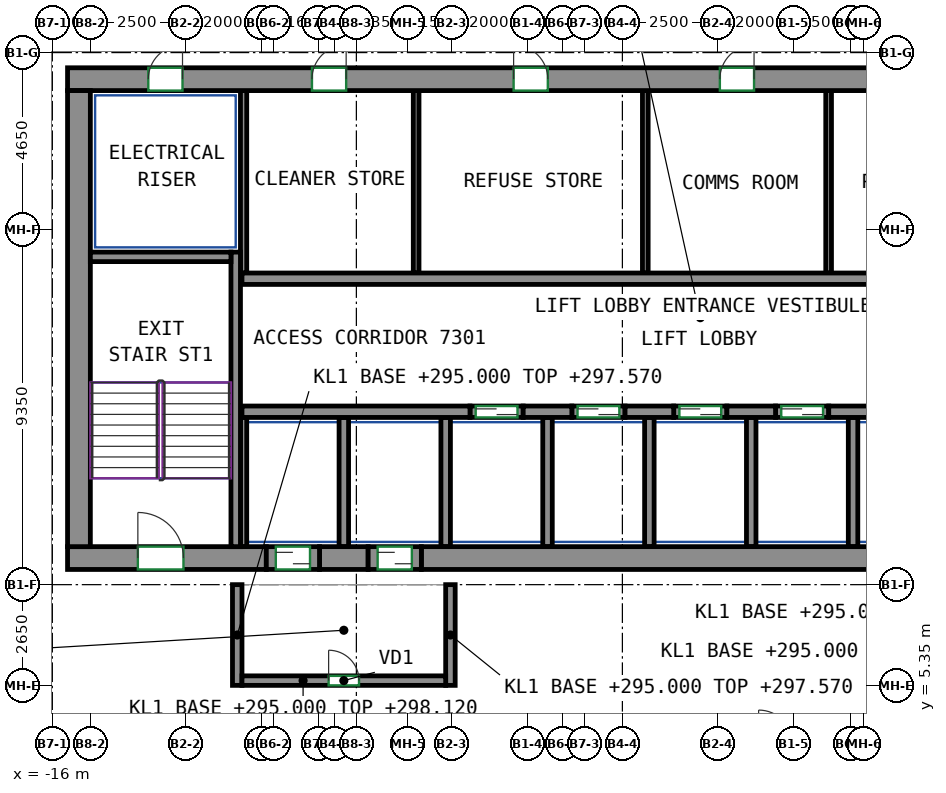
"""IFC4 building model, lengths in metres.
Left out: names, types, materials, properties, quantities, classifications, styles, units other than length and angle.
Written with IfcOpenShell. Run it as: python <this file> out.ifc"""

import sys

from ifc_helpers import new_model, si_unit, direction, frame, frame_2d, origin, place, context, subcontext, project, spatial, rectangle, extrude, source, transform, mapped, element, fill, save


model = new_model("IFC4")
c1 = context("Model", 3, precision=1e-05, world=origin(), true_north=direction((0.0, 1.0)))
c2 = subcontext(c1, "Body", "Model", "MODEL_VIEW")
j1 = project(units=[si_unit("LENGTHUNIT", "METRE"), si_unit("PLANEANGLEUNIT", "RADIAN")], contexts=[c1])
p1 = place(None, origin())
s1 = spatial("IfcSite", under=j1, at=p1, CompositionType="ELEMENT")
p2 = place(p1, origin())
s2 = spatial("IfcBuilding", under=s1, at=p2, CompositionType="ELEMENT")
p3 = place(p2, frame((0.0, 0.0, 295.0)))
s3 = spatial("IfcBuildingStorey", under=s2, at=p3, CompositionType="ELEMENT", Elevation=295.0)
m1 = source(origin(), c2, "Body", "SweptSolid", [
    extrude(rectangle(XDim=5.23, YDim=0.6, at=frame_2d((2.615, 0.0))), origin(), (0.0, 0.0, 1.0), 3.12),
])
p4 = place(p3, frame((-15.6, 8.7, 0.0), z_axis=(0.0, 0.0, 1.0), x_axis=(1.0, 0.0, 0.0)))
e1 = element("IfcWall", 1, at=p4, inside=s3, PredefinedType="SHEAR", context=c2, shape_type="MappedRepresentation", body=[
    mapped(m1, transform((0.0, 0.0, 0.0))),
])
p5 = place(p4, frame((1.85, 0.0, 0.0)))
e2 = element("IfcOpeningElement", 2, at=p5, cuts=e1, PredefinedType="OPENING", context=c2, shape_type="SweptSolid", body=[
    extrude(rectangle(XDim=1.2, YDim=2.1, at=frame_2d((0.6, 1.05))), frame((0.0, 0.31, 0.0), z_axis=(0.0, -1.0, 0.0), x_axis=(1.0, 0.0, 0.0)), (0.0, 0.0, 1.0), 0.62),
])
m2 = source(origin(), c2, "Body", "SweptSolid", [
    extrude(rectangle(XDim=1.28, YDim=0.6, at=frame_2d((0.64, 0.0))), origin(), (0.0, 0.0, 1.0), 3.12),
])
p6 = place(p3, frame((-8.97, 8.7, 0.0), z_axis=(0.0, 0.0, 1.0), x_axis=(1.0, 0.0, 0.0)))
e3 = element("IfcWall", 3, at=p6, inside=s3, PredefinedType="SHEAR", context=c2, shape_type="MappedRepresentation", body=[
    mapped(m2, transform((0.0, 0.0, 0.0))),
])
m3 = source(origin(), c2, "Body", "SweptSolid", [
    extrude(rectangle(XDim=14.18, YDim=0.6, at=frame_2d((7.09, 0.0))), origin(), (0.0, 0.0, 1.0), 3.12),
])
p7 = place(p3, frame((-6.29, 8.7, 0.0), z_axis=(0.0, 0.0, 1.0), x_axis=(1.0, 0.0, 0.0)))
e4 = element("IfcWall", 4, at=p7, inside=s3, PredefinedType="SHEAR", context=c2, shape_type="MappedRepresentation", body=[
    mapped(m3, transform((0.0, 0.0, 0.0))),
])
m4 = source(origin(), c2, "Body", "SweptSolid", [
    extrude(rectangle(XDim=33.3, YDim=0.6, at=frame_2d((16.65, 0.0))), origin(), (0.0, 0.0, 1.0), 3.12),
])
p8 = place(p3, frame((-15.6, 21.3, 0.0), z_axis=(0.0, 0.0, 1.0), x_axis=(1.0, 0.0, 0.0)))
e5 = element("IfcWall", 5, at=p8, inside=s3, PredefinedType="SHEAR", context=c2, shape_type="MappedRepresentation", body=[
    mapped(m4, transform((0.0, 0.0, 0.0))),
])
p9 = place(p8, frame((6.431, 0.0, 0.0)))
e6 = element("IfcOpeningElement", 6, at=p9, cuts=e5, PredefinedType="OPENING", context=c2, shape_type="SweptSolid", body=[
    extrude(rectangle(XDim=0.9, YDim=2.1, at=frame_2d((0.45, 1.05))), frame((0.0, 0.31, 0.0), z_axis=(0.0, -1.0, 0.0), x_axis=(1.0, 0.0, 0.0)), (0.0, 0.0, 1.0), 0.62),
])
p10 = place(p8, frame((11.738, 0.0, 0.0)))
e7 = element("IfcOpeningElement", 7, at=p10, cuts=e5, PredefinedType="OPENING", context=c2, shape_type="SweptSolid", body=[
    extrude(rectangle(XDim=0.9, YDim=2.1, at=frame_2d((0.45, 1.05))), frame((0.0, 0.31, 0.0), z_axis=(0.0, -1.0, 0.0), x_axis=(1.0, 0.0, 0.0)), (0.0, 0.0, 1.0), 0.62),
])
p11 = place(p8, frame((17.165, 0.0, 0.0)))
e8 = element("IfcOpeningElement", 8, at=p11, cuts=e5, PredefinedType="OPENING", context=c2, shape_type="SweptSolid", body=[
    extrude(rectangle(XDim=0.9, YDim=2.1, at=frame_2d((0.45, 1.05))), frame((0.0, 0.31, 0.0), z_axis=(0.0, -1.0, 0.0), x_axis=(1.0, 0.0, 0.0)), (0.0, 0.0, 1.0), 0.62),
])
p12 = place(p8, frame((21.386, 0.0, 0.0)))
e9 = element("IfcOpeningElement", 9, at=p12, cuts=e5, PredefinedType="OPENING", context=c2, shape_type="SweptSolid", body=[
    extrude(rectangle(XDim=0.9, YDim=2.1, at=frame_2d((0.45, 1.05))), frame((0.0, 0.31, 0.0), z_axis=(0.0, -1.0, 0.0), x_axis=(1.0, 0.0, 0.0)), (0.0, 0.0, 1.0), 0.62),
])
p13 = place(p8, frame((24.387, 0.0, 0.0)))
e10 = element("IfcOpeningElement", 10, at=p13, cuts=e5, PredefinedType="OPENING", context=c2, shape_type="SweptSolid", body=[
    extrude(rectangle(XDim=0.9, YDim=2.1, at=frame_2d((0.45, 1.05))), frame((0.0, 0.31, 0.0), z_axis=(0.0, -1.0, 0.0), x_axis=(1.0, 0.0, 0.0)), (0.0, 0.0, 1.0), 0.62),
])
p14 = place(p8, frame((26.92, 0.0, 0.0)))
e11 = element("IfcOpeningElement", 11, at=p14, cuts=e5, PredefinedType="OPENING", context=c2, shape_type="SweptSolid", body=[
    extrude(rectangle(XDim=0.9, YDim=2.1, at=frame_2d((0.45, 1.05))), frame((0.0, 0.31, 0.0), z_axis=(0.0, -1.0, 0.0), x_axis=(1.0, 0.0, 0.0)), (0.0, 0.0, 1.0), 0.62),
])
p15 = place(p8, frame((2.125, 0.0, 0.0)))
e12 = element("IfcOpeningElement", 12, at=p15, cuts=e5, PredefinedType="OPENING", context=c2, shape_type="SweptSolid", body=[
    extrude(rectangle(XDim=0.9, YDim=2.1, at=frame_2d((0.45, 1.05))), frame((0.0, 0.31, 0.0), z_axis=(0.0, -1.0, 0.0), x_axis=(1.0, 0.0, 0.0)), (0.0, 0.0, 1.0), 0.62),
])
p16 = place(p8, frame((30.275, 0.0, 0.0)))
e13 = element("IfcOpeningElement", 13, at=p16, cuts=e5, PredefinedType="OPENING", context=c2, shape_type="SweptSolid", body=[
    extrude(rectangle(XDim=0.9, YDim=2.1, at=frame_2d((0.45, 1.05))), frame((0.0, 0.31, 0.0), z_axis=(0.0, -1.0, 0.0), x_axis=(1.0, 0.0, 0.0)), (0.0, 0.0, 1.0), 0.62),
])
m5 = source(origin(), c2, "Body", "SweptSolid", [
    extrude(rectangle(XDim=12.0, YDim=0.6, at=frame_2d((6.0, 0.0))), origin(), (0.0, 0.0, 1.0), 3.12),
])
p17 = place(p3, frame((-15.3, 9.0, 0.0), z_axis=(0.0, 0.0, 1.0), x_axis=(0.0, 1.0, 0.0)))
e14 = element("IfcWall", 14, at=p17, inside=s3, PredefinedType="SHEAR", context=c2, shape_type="MappedRepresentation", body=[
    mapped(m5, transform((0.0, 0.0, 0.0))),
])
m6 = source(origin(), c2, "Body", "SweptSolid", [
    extrude(rectangle(XDim=7.75, YDim=0.25, at=frame_2d((3.875, 0.0))), origin(), (0.0, 0.0, 1.0), 3.12),
])
p18 = place(p3, frame((-11.175, 9.0, 0.0), z_axis=(0.0, 0.0, 1.0), x_axis=(0.0, 1.0, 0.0)))
e15 = element("IfcWall", 15, at=p18, inside=s3, PredefinedType="SHEAR", context=c2, shape_type="MappedRepresentation", body=[
    mapped(m6, transform((0.0, 0.0, 0.0))),
])
m7 = source(origin(), c2, "Body", "SweptSolid", [
    extrude(rectangle(XDim=3.7, YDim=0.25, at=frame_2d((1.85, 0.0))), origin(), (0.0, 0.0, 1.0), 3.12),
])
p19 = place(p3, frame((-15.0, 16.625, 0.0), z_axis=(0.0, 0.0, 1.0), x_axis=(1.0, 0.0, 0.0)))
e16 = element("IfcWall", 16, at=p19, inside=s3, PredefinedType="SHEAR", context=c2, shape_type="MappedRepresentation", body=[
    mapped(m7, transform((0.0, 0.0, 0.0))),
])
m8 = source(origin(), c2, "Body", "SweptSolid", [
    extrude(rectangle(XDim=6.0, YDim=0.3, at=frame_2d((3.0, 0.0))), origin(), (0.0, 0.0, 1.0), 3.12),
])
p20 = place(p3, frame((-11.01, 12.55, 0.0), z_axis=(0.0, 0.0, 1.0), x_axis=(1.0, 0.0, 0.0)))
e17 = element("IfcWall", 17, at=p20, inside=s3, PredefinedType="SHEAR", context=c2, shape_type="MappedRepresentation", body=[
    mapped(m8, transform((0.0, 0.0, 0.0))),
])
m9 = source(origin(), c2, "Body", "SweptSolid", [
    extrude(rectangle(XDim=1.28, YDim=0.3, at=frame_2d((0.64, 0.0))), origin(), (0.0, 0.0, 1.0), 3.12),
])
for number, where, z_axis, x_axis in (
    (18, (-3.61, 12.55, 0.0), (0.0, 0.0, 1.0), (1.0, 0.0, 0.0)),
    (19, (-0.93, 12.55, 0.0), (0.0, 0.0, 1.0), (1.0, 0.0, 0.0)),
    (20, (1.75, 12.55, 0.0), (0.0, 0.0, 1.0), (1.0, 0.0, 0.0)),
    (21, (4.43, 12.55, 0.0), (0.0, 0.0, 1.0), (1.0, 0.0, 0.0)),
):
    element("IfcWall", number, at=place(p3, frame(where, z_axis=z_axis, x_axis=x_axis)), inside=s3, PredefinedType="SHEAR", context=c2, shape_type="MappedRepresentation", body=[
        mapped(m9, transform((0.0, 0.0, 0.0))),
    ])
m10 = source(origin(), c2, "Body", "SweptSolid", [
    extrude(rectangle(XDim=22.08, YDim=0.3, at=frame_2d((11.04, 0.0))), origin(), (0.0, 0.0, 1.0), 3.12),
])
p21 = place(p3, frame((-11.01, 16.05, 0.0), z_axis=(0.0, 0.0, 1.0), x_axis=(1.0, 0.0, 0.0)))
e22 = element("IfcWall", 22, at=p21, inside=s3, PredefinedType="SHEAR", context=c2, shape_type="MappedRepresentation", body=[
    mapped(m10, transform((0.0, 0.0, 0.0))),
])
m11 = source(origin(), c2, "Body", "SweptSolid", [
    extrude(rectangle(XDim=1.4, YDim=0.3, at=frame_2d((0.7, 0.0))), origin(), (0.0, 0.0, 1.0), 3.12),
])
p22 = place(p3, frame((-5.01, 12.55, 0.0), z_axis=(0.0, 0.0, 1.0), x_axis=(1.0, 0.0, 0.0)))
e23 = element("IfcWall", 23, at=p22, inside=s3, PredefinedType="PARTITIONING", context=c2, shape_type="MappedRepresentation", body=[
    mapped(m11, transform((0.0, 0.0, 0.0))),
])
p23 = place(p22, frame((0.15, 0.0, 0.0)))
e24 = element("IfcOpeningElement", 24, at=p23, cuts=e23, PredefinedType="OPENING", context=c2, shape_type="SweptSolid", body=[
    extrude(rectangle(XDim=1.1, YDim=2.1, at=frame_2d((0.55, 1.05))), frame((0.0, 0.16, 0.0), z_axis=(0.0, -1.0, 0.0), x_axis=(1.0, 0.0, 0.0)), (0.0, 0.0, 1.0), 0.32),
])
m12 = source(origin(), c2, "Body", "SweptSolid", [
    extrude(rectangle(XDim=1.4, YDim=0.3, at=frame_2d((0.7, 0.0))), origin(), (0.0, 0.0, 1.0), 3.12),
])
p24 = place(p3, frame((-2.33, 12.55, 0.0), z_axis=(0.0, 0.0, 1.0), x_axis=(1.0, 0.0, 0.0)))
e25 = element("IfcWall", 25, at=p24, inside=s3, PredefinedType="PARTITIONING", context=c2, shape_type="MappedRepresentation", body=[
    mapped(m12, transform((0.0, 0.0, 0.0))),
])
p25 = place(p24, frame((0.15, 0.0, 0.0)))
e26 = element("IfcOpeningElement", 26, at=p25, cuts=e25, PredefinedType="OPENING", context=c2, shape_type="SweptSolid", body=[
    extrude(rectangle(XDim=1.1, YDim=2.1, at=frame_2d((0.55, 1.05))), frame((0.0, 0.16, 0.0), z_axis=(0.0, -1.0, 0.0), x_axis=(1.0, 0.0, 0.0)), (0.0, 0.0, 1.0), 0.32),
])
p26 = place(p3, frame((0.35, 12.55, 0.0), z_axis=(0.0, 0.0, 1.0), x_axis=(1.0, 0.0, 0.0)))
e27 = element("IfcWall", 27, at=p26, inside=s3, PredefinedType="PARTITIONING", context=c2, shape_type="MappedRepresentation", body=[
    mapped(m11, transform((0.0, 0.0, 0.0))),
])
p27 = place(p26, frame((0.15, 0.0, 0.0)))
e28 = element("IfcOpeningElement", 28, at=p27, cuts=e27, PredefinedType="OPENING", context=c2, shape_type="SweptSolid", body=[
    extrude(rectangle(XDim=1.1, YDim=2.1, at=frame_2d((0.55, 1.05))), frame((0.0, 0.16, 0.0), z_axis=(0.0, -1.0, 0.0), x_axis=(1.0, 0.0, 0.0)), (0.0, 0.0, 1.0), 0.32),
])
p28 = place(p3, frame((3.03, 12.55, 0.0), z_axis=(0.0, 0.0, 1.0), x_axis=(1.0, 0.0, 0.0)))
e29 = element("IfcWall", 29, at=p28, inside=s3, PredefinedType="PARTITIONING", context=c2, shape_type="MappedRepresentation", body=[
    mapped(m11, transform((0.0, 0.0, 0.0))),
])
p29 = place(p28, frame((0.15, 0.0, 0.0)))
e30 = element("IfcOpeningElement", 30, at=p29, cuts=e29, PredefinedType="OPENING", context=c2, shape_type="SweptSolid", body=[
    extrude(rectangle(XDim=1.1, YDim=2.1, at=frame_2d((0.55, 1.05))), frame((0.0, 0.16, 0.0), z_axis=(0.0, -1.0, 0.0), x_axis=(1.0, 0.0, 0.0)), (0.0, 0.0, 1.0), 0.32),
])
m13 = source(origin(), c2, "Body", "SweptSolid", [
    extrude(rectangle(XDim=2.65, YDim=0.25, at=frame_2d((1.325, 0.0))), origin(), (0.0, 0.0, 1.0), 2.57),
])
for number, where, z_axis, x_axis in (
    (31, (-11.135, 5.35, 0.0), (0.0, 0.0, 1.0), (0.0, 1.0, 0.0)),
    (32, (-5.525, 5.35, 0.0), (0.0, 0.0, 1.0), (0.0, 1.0, 0.0)),
):
    element("IfcWall", number, at=place(p3, frame(where, z_axis=z_axis, x_axis=x_axis)), inside=s3, PredefinedType="PARTITIONING", context=c2, shape_type="MappedRepresentation", body=[
        mapped(m13, transform((0.0, 0.0, 0.0))),
    ])
m14 = source(origin(), c2, "Body", "SweptSolid", [
    extrude(rectangle(XDim=5.36, YDim=0.25, at=frame_2d((2.68, 0.0))), origin(), (0.0, 0.0, 1.0), 3.12),
])
p30 = place(p3, frame((-11.01, 5.475, 0.0), z_axis=(0.0, 0.0, 1.0), x_axis=(1.0, 0.0, 0.0)))
e33 = element("IfcWall", 33, at=p30, inside=s3, PredefinedType="PARTITIONING", context=c2, shape_type="MappedRepresentation", body=[
    mapped(m14, transform((0.0, 0.0, 0.0))),
])
p31 = place(p30, frame((2.28, 0.0, 0.0)))
e34 = element("IfcOpeningElement", 34, at=p31, cuts=e33, PredefinedType="OPENING", context=c2, shape_type="SweptSolid", body=[
    extrude(rectangle(XDim=0.8, YDim=2.0, at=frame_2d((0.4, 1.0))), frame((0.0, 0.135, 0.0), z_axis=(0.0, -1.0, 0.0), x_axis=(1.0, 0.0, 0.0)), (0.0, 0.0, 1.0), 0.27),
])
m15 = source(origin(), c2, "Body", "SweptSolid", [
    extrude(rectangle(XDim=4.8, YDim=0.165, at=frame_2d((2.4, 0.0))), origin(), (0.0, 0.0, 1.0), 3.12),
])
p32 = place(p3, frame((-10.968, 16.2, 0.0), z_axis=(0.0, 0.0, 1.0), x_axis=(0.0, 1.0, 0.0)))
e35 = element("IfcWall", 35, at=p32, inside=s3, PredefinedType="PARTITIONING", context=c2, shape_type="MappedRepresentation", body=[
    mapped(m15, transform((0.0, 0.0, 0.0))),
])
m16 = source(origin(), c2, "Body", "SweptSolid", [
    extrude(rectangle(XDim=3.4, YDim=0.25, at=frame_2d((1.7, 0.0))), origin(), (0.0, 0.0, 1.0), 3.12),
])
for number, where, z_axis, x_axis in (
    (36, (2.39, 9.0, 0.0), (0.0, 0.0, 1.0), (0.0, 1.0, 0.0)),
    (37, (5.07, 9.0, 0.0), (0.0, 0.0, 1.0), (0.0, 1.0, 0.0)),
    (38, (-0.29, 9.0, 0.0), (0.0, 0.0, 1.0), (0.0, 1.0, 0.0)),
):
    element("IfcWall", number, at=place(p3, frame(where, z_axis=z_axis, x_axis=x_axis)), inside=s3, PredefinedType="PARTITIONING", context=c2, shape_type="MappedRepresentation", body=[
        mapped(m16, transform((0.0, 0.0, 0.0))),
    ])
m17 = source(origin(), c2, "Body", "SweptSolid", [
    extrude(rectangle(XDim=3.4, YDim=0.165, at=frame_2d((1.7, 0.0))), origin(), (0.0, 0.0, 1.0), 3.12),
])
p33 = place(p3, frame((-10.968, 9.0, 0.0), z_axis=(0.0, 0.0, 1.0), x_axis=(0.0, 1.0, 0.0)))
e39 = element("IfcWall", 39, at=p33, inside=s3, PredefinedType="PARTITIONING", context=c2, shape_type="MappedRepresentation", body=[
    mapped(m17, transform((0.0, 0.0, 0.0))),
])
for number, where, z_axis, x_axis in (
    (40, (-2.97, 9.0, 0.0), (0.0, 0.0, 1.0), (0.0, 1.0, 0.0)),
    (41, (-5.65, 9.0, 0.0), (0.0, 0.0, 1.0), (0.0, 1.0, 0.0)),
    (42, (-8.33, 9.0, 0.0), (0.0, 0.0, 1.0), (0.0, 1.0, 0.0)),
):
    element("IfcWall", number, at=place(p3, frame(where, z_axis=z_axis, x_axis=x_axis)), inside=s3, PredefinedType="PARTITIONING", context=c2, shape_type="MappedRepresentation", body=[
        mapped(m16, transform((0.0, 0.0, 0.0))),
    ])
m18 = source(origin(), c2, "Body", "SweptSolid", [
    extrude(rectangle(XDim=4.8, YDim=0.15, at=frame_2d((2.4, 0.0))), origin(), (0.0, 0.0, 1.0), 3.12),
])
for number, where, z_axis, x_axis in (
    (43, (-6.427, 16.2, 0.0), (0.0, 0.0, 1.0), (0.0, 1.0, 0.0)),
    (44, (-0.397, 16.2, 0.0), (0.0, 0.0, 1.0), (0.0, 1.0, 0.0)),
    (45, (4.427, 16.2, 0.0), (0.0, 0.0, 1.0), (0.0, 1.0, 0.0)),
):
    element("IfcWall", number, at=place(p3, frame(where, z_axis=z_axis, x_axis=x_axis)), inside=s3, PredefinedType="PARTITIONING", context=c2, shape_type="MappedRepresentation", body=[
        mapped(m18, transform((0.0, 0.0, 0.0))),
    ])
m19 = source(origin(), c2, "Body", "SweptSolid", [
    extrude(rectangle(XDim=1.4, YDim=0.6, at=frame_2d((0.7, 0.0))), origin(), (0.0, 0.0, 1.0), 2.7),
])
p34 = place(p3, frame((-10.37, 8.7, 0.0), z_axis=(0.0, 0.0, 1.0), x_axis=(1.0, 0.0, 0.0)))
e46 = element("IfcWall", 46, at=p34, inside=s3, PredefinedType="PARTITIONING", context=c2, shape_type="MappedRepresentation", body=[
    mapped(m19, transform((0.0, 0.0, 0.0))),
])
p35 = place(p34, frame((0.25, 0.0, 0.0)))
e47 = element("IfcOpeningElement", 47, at=p35, cuts=e46, PredefinedType="OPENING", context=c2, shape_type="SweptSolid", body=[
    extrude(rectangle(XDim=0.9, YDim=2.1, at=frame_2d((0.45, 1.05))), frame((0.0, 0.31, 0.0), z_axis=(0.0, -1.0, 0.0), x_axis=(1.0, 0.0, 0.0)), (0.0, 0.0, 1.0), 0.62),
])
m20 = source(origin(), c2, "Body", "SweptSolid", [
    extrude(rectangle(XDim=1.4, YDim=0.6, at=frame_2d((0.7, 0.0))), origin(), (0.0, 0.0, 1.0), 2.7),
])
p36 = place(p3, frame((-7.69, 8.7, 0.0), z_axis=(0.0, 0.0, 1.0), x_axis=(1.0, 0.0, 0.0)))
e48 = element("IfcWall", 48, at=p36, inside=s3, PredefinedType="PARTITIONING", context=c2, shape_type="MappedRepresentation", body=[
    mapped(m20, transform((0.0, 0.0, 0.0))),
])
p37 = place(p36, frame((0.25, 0.0, 0.0)))
e49 = element("IfcOpeningElement", 49, at=p37, cuts=e48, PredefinedType="OPENING", context=c2, shape_type="SweptSolid", body=[
    extrude(rectangle(XDim=0.9, YDim=2.1, at=frame_2d((0.45, 1.05))), frame((0.0, 0.31, 0.0), z_axis=(0.0, -1.0, 0.0), x_axis=(1.0, 0.0, 0.0)), (0.0, 0.0, 1.0), 0.62),
])
p38 = place(p31, origin())
e50 = element("IfcDoor", 50, at=p38, inside=s3, OperationType="SINGLE_SWING_LEFT", PredefinedType="DOOR", context=c2, shape_type="SweptSolid", body=[
    extrude(rectangle(XDim=0.8, YDim=2.0, at=frame_2d((0.4, 1.0))), frame((0.0, 0.025, 0.0), z_axis=(0.0, -1.0, 0.0), x_axis=(1.0, 0.0, 0.0)), (0.0, 0.0, 1.0), 0.05),
])
fill(e34, e50)
p39 = place(p35, origin())
e51 = element("IfcDoor", 51, at=p39, inside=s3, OperationType="SLIDING_TO_LEFT", PredefinedType="DOOR", context=c2, shape_type="SweptSolid", body=[
    extrude(rectangle(XDim=0.9, YDim=2.1, at=frame_2d((0.45, 1.05))), frame((0.0, 0.205, 0.0), z_axis=(0.0, -1.0, 0.0), x_axis=(1.0, 0.0, 0.0)), (0.0, 0.0, 1.0), 0.05),
])
fill(e47, e51)
p40 = place(p37, origin())
e52 = element("IfcDoor", 52, at=p40, inside=s3, OperationType="SLIDING_TO_RIGHT", PredefinedType="DOOR", context=c2, shape_type="SweptSolid", body=[
    extrude(rectangle(XDim=0.9, YDim=2.1, at=frame_2d((0.45, 1.05))), frame((0.0, 0.205, 0.0), z_axis=(0.0, -1.0, 0.0), x_axis=(1.0, 0.0, 0.0)), (0.0, 0.0, 1.0), 0.05),
])
fill(e49, e52)
p41 = place(p23, origin())
e53 = element("IfcDoor", 53, at=p41, inside=s3, OperationType="DOUBLE_DOOR_SLIDING", PredefinedType="DOOR", context=c2, shape_type="SweptSolid", body=[
    extrude(rectangle(XDim=1.1, YDim=2.1, at=frame_2d((0.55, 1.05))), frame((0.0, 0.025, 0.0), z_axis=(0.0, -1.0, 0.0), x_axis=(1.0, 0.0, 0.0)), (0.0, 0.0, 1.0), 0.05),
])
fill(e24, e53)
p42 = place(p25, origin())
e54 = element("IfcDoor", 54, at=p42, inside=s3, OperationType="DOUBLE_DOOR_SLIDING", PredefinedType="DOOR", context=c2, shape_type="SweptSolid", body=[
    extrude(rectangle(XDim=1.1, YDim=2.1, at=frame_2d((0.55, 1.05))), frame((0.0, 0.025, 0.0), z_axis=(0.0, -1.0, 0.0), x_axis=(1.0, 0.0, 0.0)), (0.0, 0.0, 1.0), 0.05),
])
fill(e26, e54)
p43 = place(p27, origin())
e55 = element("IfcDoor", 55, at=p43, inside=s3, OperationType="DOUBLE_DOOR_SLIDING", PredefinedType="DOOR", context=c2, shape_type="SweptSolid", body=[
    extrude(rectangle(XDim=1.1, YDim=2.1, at=frame_2d((0.55, 1.05))), frame((0.0, 0.025, 0.0), z_axis=(0.0, -1.0, 0.0), x_axis=(1.0, 0.0, 0.0)), (0.0, 0.0, 1.0), 0.05),
])
fill(e28, e55)
p44 = place(p29, origin())
e56 = element("IfcDoor", 56, at=p44, inside=s3, OperationType="DOUBLE_DOOR_SLIDING", PredefinedType="DOOR", context=c2, shape_type="SweptSolid", body=[
    extrude(rectangle(XDim=1.1, YDim=2.1, at=frame_2d((0.55, 1.05))), frame((0.0, 0.025, 0.0), z_axis=(0.0, -1.0, 0.0), x_axis=(1.0, 0.0, 0.0)), (0.0, 0.0, 1.0), 0.05),
])
fill(e30, e56)
p45 = place(p9, origin())
e57 = element("IfcDoor", 57, at=p45, inside=s3, OperationType="SINGLE_SWING_RIGHT", PredefinedType="DOOR", context=c2, shape_type="SweptSolid", body=[
    extrude(rectangle(XDim=0.9, YDim=2.1, at=frame_2d((0.45, 1.05))), frame((0.0, -0.155, 0.0), z_axis=(0.0, -1.0, 0.0), x_axis=(1.0, 0.0, 0.0)), (0.0, 0.0, 1.0), 0.05),
])
fill(e6, e57)
p46 = place(p10, origin())
e58 = element("IfcDoor", 58, at=p46, inside=s3, OperationType="SINGLE_SWING_LEFT", PredefinedType="DOOR", context=c2, shape_type="SweptSolid", body=[
    extrude(rectangle(XDim=0.9, YDim=2.1, at=frame_2d((0.45, 1.05))), frame((0.0, -0.155, 0.0), z_axis=(0.0, -1.0, 0.0), x_axis=(1.0, 0.0, 0.0)), (0.0, 0.0, 1.0), 0.05),
])
fill(e7, e58)
p47 = place(p11, origin())
e59 = element("IfcDoor", 59, at=p47, inside=s3, OperationType="SINGLE_SWING_RIGHT", PredefinedType="DOOR", context=c2, shape_type="SweptSolid", body=[
    extrude(rectangle(XDim=0.9, YDim=2.1, at=frame_2d((0.45, 1.05))), frame((0.0, -0.155, 0.0), z_axis=(0.0, -1.0, 0.0), x_axis=(1.0, 0.0, 0.0)), (0.0, 0.0, 1.0), 0.05),
])
fill(e8, e59)
p48 = place(p15, origin())
e60 = element("IfcDoor", 60, at=p48, inside=s3, OperationType="SINGLE_SWING_RIGHT", PredefinedType="DOOR", context=c2, shape_type="SweptSolid", body=[
    extrude(rectangle(XDim=0.9, YDim=2.1, at=frame_2d((0.45, 1.05))), frame((0.0, -0.155, 0.0), z_axis=(0.0, -1.0, 0.0), x_axis=(1.0, 0.0, 0.0)), (0.0, 0.0, 1.0), 0.05),
])
fill(e12, e60)
p49 = place(p5, origin())
e61 = element("IfcDoor", 61, at=p49, inside=s3, OperationType="DOUBLE_DOOR_SINGLE_SWING", PredefinedType="DOOR", context=c2, shape_type="SweptSolid", body=[
    extrude(rectangle(XDim=1.2, YDim=2.1, at=frame_2d((0.6, 1.05))), frame((0.0, 0.205, 0.0), z_axis=(0.0, -1.0, 0.0), x_axis=(1.0, 0.0, 0.0)), (0.0, 0.0, 1.0), 0.05),
])
fill(e2, e61)
save(model, sys.argv[1])
